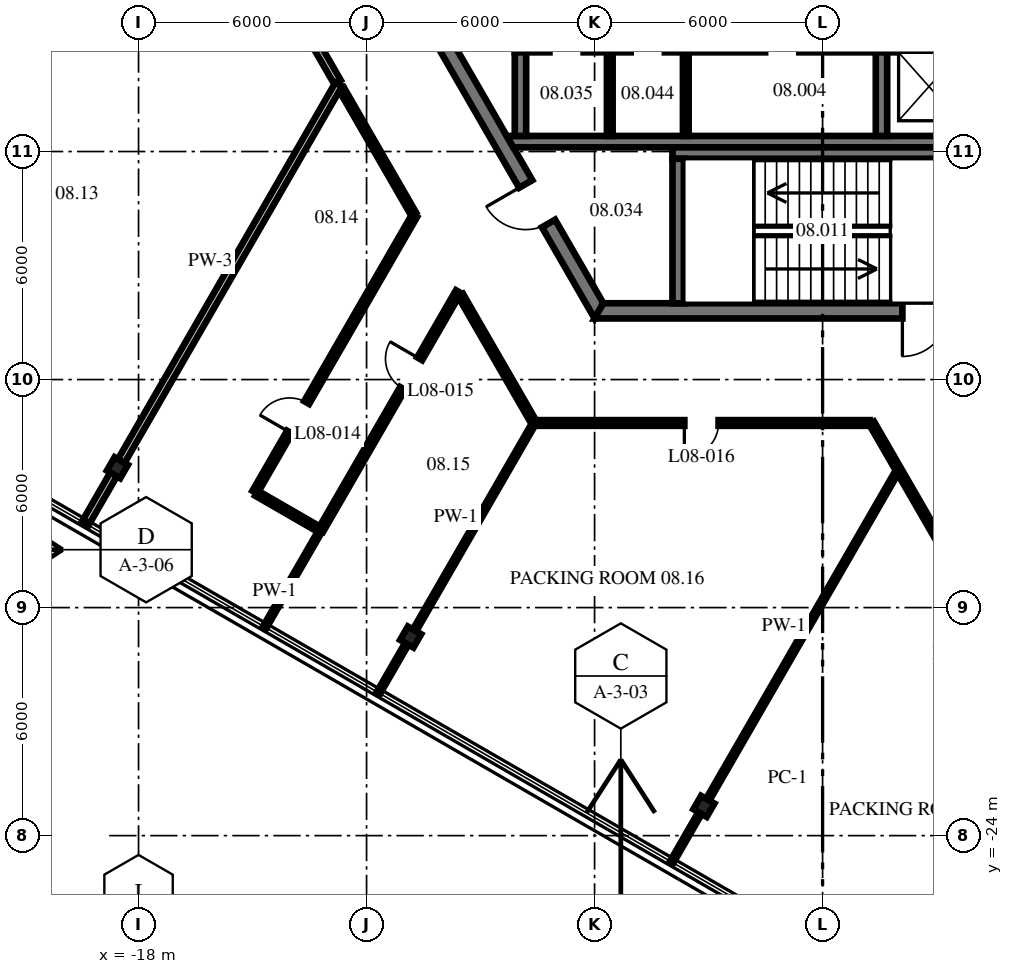
"""IFC4 building model, lengths in metres.
Left out: names, types, materials, properties, quantities, classifications, styles, units other than length and angle.
Written with IfcOpenShell. Run it as: python <this file> out.ifc"""

import sys

from ifc_helpers import new_model, si_unit, direction, frame, frame_2d, origin, origin_2d, place, context, subcontext, project, spatial, polyline, rectangle, i_section, outline, extrude, source, transform, mapped, element, fill, save


model = new_model("IFC4")
c1 = context("Model", 3, precision=1e-05, world=origin(), true_north=direction((0.0, 1.0)))
c2 = subcontext(c1, "Body", "Model", "MODEL_VIEW")
j1 = project(units=[si_unit("LENGTHUNIT", "METRE"), si_unit("PLANEANGLEUNIT", "RADIAN")], contexts=[c1])
p1 = place(None, origin())
s1 = spatial("IfcSite", under=j1, at=p1, CompositionType="ELEMENT")
p2 = place(p1, origin())
s2 = spatial("IfcBuilding", under=s1, at=p2, CompositionType="ELEMENT")
p3 = place(p2, frame((0.0, 0.0, 37.5)))
s3 = spatial("IfcBuildingStorey", under=s2, at=p3, CompositionType="ELEMENT", Elevation=37.5)
m1 = source(origin(), c2, "Body", "SweptSolid", [
    extrude(i_section(OverallWidth=0.404, OverallDepth=0.406, WebThickness=0.027, FlangeThickness=0.044, at=origin_2d()), origin(), (0.0, 0.0, 1.0), 4.3),
])
for number, where, z_axis, x_axis in (
    (1, (-18.556, -14.32, 0.0), (0.0, 0.0, 1.0), (0.866, -0.5, 0.0)),
    (2, (-10.84, -18.775, 0.0), (0.0, 0.0, 1.0), (0.866, -0.5, 0.0)),
    (3, (-3.124, -23.23, 0.0), (0.0, 0.0, 1.0), (0.866, -0.5, 0.0)),
):
    element("IfcColumn", number, at=place(p3, frame(where, z_axis=z_axis, x_axis=x_axis)), inside=s3, PredefinedType="COLUMN", context=c2, shape_type="MappedRepresentation", body=[
        mapped(m1, transform((0.0, 0.0, 0.0), scale=1.0)),
    ])
m2 = source(origin(), c2, "Body", "SweptSolid", [
    extrude(outline(polyline([(-0.115, -0.2), (11.885, -0.2), (11.654, 0.2), (0.115, 0.2), (-0.115, -0.2)])), origin(), (0.0, 0.0, 1.0), 4.1),
])
p4 = place(p3, frame((-11.769, 0.0, 0.0), z_axis=(0.0, 0.0, 1.0), x_axis=(0.499996592174, -0.866027371285, 0.0)))
e4 = element("IfcWall", 4, at=p4, inside=s3, PredefinedType="SHEAR", context=c2, shape_type="MappedRepresentation", body=[
    mapped(m2, transform((0.0, 0.0, 0.0), scale=1.0)),
])
p5 = place(p4, frame((1.405, 0.0, 0.0)))
e5 = element("IfcOpeningElement", 5, at=p5, cuts=e4, PredefinedType="OPENING", context=c2, shape_type="SweptSolid", body=[
    extrude(rectangle(XDim=1.8, YDim=2.1, at=frame_2d((0.9, 1.05))), frame((0.0, 0.21, 0.0), z_axis=(0.0, -1.0, 0.0), x_axis=(1.0, 0.0, 0.0)), (0.0, 0.0, 1.0), 0.42),
])
p6 = place(p4, frame((7.915, 0.0, 0.0)))
e6 = element("IfcOpeningElement", 6, at=p6, cuts=e4, PredefinedType="OPENING", context=c2, shape_type="SweptSolid", body=[
    extrude(rectangle(XDim=1.2, YDim=2.1, at=frame_2d((0.6, 1.05))), frame((0.0, 0.21, 0.0), z_axis=(0.0, -1.0, 0.0), x_axis=(1.0, 0.0, 0.0)), (0.0, 0.0, 1.0), 0.42),
])
p7 = place(p3, frame((-5.885, -10.192, 0.0), z_axis=(0.0, 0.0, 1.0), x_axis=(1.0, 0.0, 0.0)))
e7 = element("IfcWall", 7, at=p7, inside=s3, PredefinedType="SHEAR", context=c2, shape_type="MappedRepresentation", body=[
    mapped(m2, transform((0.0, 0.0, 0.0), scale=1.0)),
])
p8 = place(p7, frame((7.985, 0.0, 0.0)))
e8 = element("IfcOpeningElement", 8, at=p8, cuts=e7, PredefinedType="OPENING", context=c2, shape_type="SweptSolid", body=[
    extrude(rectangle(XDim=1.2, YDim=2.1, at=frame_2d((0.6, 1.05))), frame((0.0, 0.21, 0.0), z_axis=(0.0, -1.0, 0.0), x_axis=(1.0, 0.0, 0.0)), (0.0, 0.0, 1.0), 0.42),
])
m3 = source(origin(), c2, "Body", "SweptSolid", [
    extrude(rectangle(XDim=12.8, YDim=0.3, at=frame_2d((6.4, 0.0))), origin(), (0.0, 0.0, 1.0), 4.1),
])
p9 = place(p3, frame((-8.1, -3.24, 0.0), z_axis=(0.0, 0.0, 1.0), x_axis=(1.0, 0.0, 0.0)))
e9 = element("IfcWall", 9, at=p9, inside=s3, PredefinedType="SHEAR", context=c2, shape_type="MappedRepresentation", body=[
    mapped(m3, transform((0.0, 0.0, 0.0), scale=1.0)),
])
p10 = place(p9, frame((0.913, 0.0, 0.0)))
e10 = element("IfcOpeningElement", 10, at=p10, cuts=e9, PredefinedType="OPENING", context=c2, shape_type="SweptSolid", body=[
    extrude(rectangle(XDim=0.9, YDim=2.1, at=frame_2d((0.45, 1.05))), frame((0.0, 0.16, 0.0), z_axis=(0.0, -1.0, 0.0), x_axis=(1.0, 0.0, 0.0)), (0.0, 0.0, 1.0), 0.32),
])
p11 = place(p9, frame((3.05, 0.0, 0.0)))
e11 = element("IfcOpeningElement", 11, at=p11, cuts=e9, PredefinedType="OPENING", context=c2, shape_type="SweptSolid", body=[
    extrude(rectangle(XDim=0.9, YDim=2.1, at=frame_2d((0.45, 1.05))), frame((0.0, 0.16, 0.0), z_axis=(0.0, -1.0, 0.0), x_axis=(1.0, 0.0, 0.0)), (0.0, 0.0, 1.0), 0.32),
])
p12 = place(p9, frame((6.587, 0.0, 0.0)))
e12 = element("IfcOpeningElement", 12, at=p12, cuts=e9, PredefinedType="OPENING", context=c2, shape_type="SweptSolid", body=[
    extrude(rectangle(XDim=0.9, YDim=2.1, at=frame_2d((0.45, 1.05))), frame((0.0, 0.16, 0.0), z_axis=(0.0, -1.0, 0.0), x_axis=(1.0, 0.0, 0.0)), (0.0, 0.0, 1.0), 0.32),
])
p13 = place(p9, frame((10.35, 0.0, 0.0)))
e13 = element("IfcOpeningElement", 13, at=p13, cuts=e9, PredefinedType="OPENING", context=c2, shape_type="SweptSolid", body=[
    extrude(rectangle(XDim=1.1, YDim=2.1, at=frame_2d((0.55, 1.05))), frame((0.0, 0.16, 0.0), z_axis=(0.0, -1.0, 0.0), x_axis=(1.0, 0.0, 0.0)), (0.0, 0.0, 1.0), 0.32),
])
m4 = source(origin(), c2, "Body", "SweptSolid", [
    extrude(outline(polyline([(12.0, -0.15), (-0.04, -0.15), (-0.213, 0.15), (12.0, 0.15), (12.0, -0.15)])), origin(), (0.0, 0.0, 1.0), 4.1),
])
p14 = place(p3, frame((-8.1, -5.74, 0.0), z_axis=(0.0, 0.0, 1.0), x_axis=(1.0, 0.0, 0.0)))
e14 = element("IfcWall", 14, at=p14, inside=s3, PredefinedType="SHEAR", context=c2, shape_type="MappedRepresentation", body=[
    mapped(m4, transform((0.0, 0.0, 0.0), scale=1.0)),
])
m5 = source(origin(), c2, "Body", "SweptSolid", [
    extrude(rectangle(XDim=2.2, YDim=0.3, at=frame_2d((1.1, 0.0))), origin(), (0.0, 0.0, 1.0), 4.1),
])
for number, where, z_axis, x_axis in (
    (15, (-7.95, -5.59, 0.0), (0.0, 0.0, 1.0), (0.0, 1.0, 0.0)),
    (16, (1.55, -5.59, 0.0), (0.0, 0.0, 1.0), (0.0, 1.0, 0.0)),
):
    element("IfcWall", number, at=place(p3, frame(where, z_axis=z_axis, x_axis=x_axis)), inside=s3, PredefinedType="SHEAR", context=c2, shape_type="MappedRepresentation", body=[
        mapped(m5, transform((0.0, 0.0, 0.0), scale=1.0)),
    ])
m6 = source(origin(), c2, "Body", "SweptSolid", [
    extrude(outline(polyline([(0.0, -0.15), (8.95, -0.15), (8.65, 0.15), (0.0, 0.15), (0.0, -0.15)])), origin(), (0.0, 0.0, 1.0), 4.1),
])
p15 = place(p3, frame((-3.95, -6.04, 0.0), z_axis=(0.0, 0.0, 1.0), x_axis=(1.0, 0.0, 0.0)))
e17 = element("IfcWall", 17, at=p15, inside=s3, PredefinedType="SHEAR", context=c2, shape_type="MappedRepresentation", body=[
    mapped(m6, transform((0.0, 0.0, 0.0), scale=1.0)),
])
m7 = source(origin(), c2, "Body", "SweptSolid", [
    extrude(outline(polyline([(3.8, -0.15), (-0.004, -0.15), (-0.004, 0.15), (3.8, 0.15), (3.8, -0.15)])), origin(), (0.0, 0.0, 1.0), 4.1),
])
p16 = place(p3, frame((-3.8, -9.99, 0.0), z_axis=(0.0, 0.0, 1.0), x_axis=(0.0, 1.0, 0.0)))
e18 = element("IfcWall", 18, at=p16, inside=s3, PredefinedType="SHEAR", context=c2, shape_type="MappedRepresentation", body=[
    mapped(m7, transform((0.0, 0.0, 0.0), scale=1.0)),
])
m8 = source(origin(), c2, "Body", "SweptSolid", [
    extrude(rectangle(XDim=2.2, YDim=0.15, at=frame_2d((1.1, 0.0))), origin(), (0.0, 0.0, 1.0), 4.1),
])
for number, where, z_axis, x_axis in (
    (19, (-5.6, -5.59, 0.0), (0.0, 0.0, 1.0), (0.0, 1.0, 0.0)),
    (20, (-3.6, -5.59, 0.0), (0.0, 0.0, 1.0), (0.0, 1.0, 0.0)),
):
    element("IfcWall", number, at=place(p3, frame(where, z_axis=z_axis, x_axis=x_axis)), inside=s3, PredefinedType="PARTITIONING", context=c2, shape_type="MappedRepresentation", body=[
        mapped(m8, transform((0.0, 0.0, 0.0), scale=1.0)),
    ])
p17 = place(p3, frame((-15.14, -0.061, 0.0), z_axis=(0.0, 0.0, 1.0), x_axis=(0.500002721793, -0.866023832351, 0.0)))
e21 = element("IfcWall", 21, at=p17, inside=s3, PredefinedType="PARTITIONING", context=c2, shape_type="SweptSolid", body=[
    extrude(rectangle(XDim=4.75, YDim=0.2, at=frame_2d((2.375, 0.0))), origin(), (0.0, 0.0, 1.0), 4.1),
])
p18 = place(p17, frame((1.88, 0.0, 0.0)))
e22 = element("IfcOpeningElement", 22, at=p18, cuts=e21, PredefinedType="OPENING", context=c2, shape_type="SweptSolid", body=[
    extrude(rectangle(XDim=1.0, YDim=2.1, at=frame_2d((0.5, 1.05))), frame((0.0, 0.11, 0.0), z_axis=(0.0, -1.0, 0.0), x_axis=(1.0, 0.0, 0.0)), (0.0, 0.0, 1.0), 0.22),
])
p19 = place(p3, frame((-12.665, -4.348, 0.0), z_axis=(0.0, 0.0, 1.0), x_axis=(0.500009333805, -0.866020014843, 0.0)))
e23 = element("IfcWall", 23, at=p19, inside=s3, PredefinedType="PARTITIONING", context=c2, shape_type="SweptSolid", body=[
    extrude(rectangle(XDim=3.806, YDim=0.15, at=frame_2d((1.903, 0.0))), origin(), (0.0, 0.0, 1.0), 4.1),
])
p20 = place(p3, frame((-9.527, -9.783, 0.0), z_axis=(0.0, 0.0, 1.0), x_axis=(0.500013098431, -0.86601784127, 0.0)))
e24 = element("IfcWall", 24, at=p20, inside=s3, PredefinedType="PARTITIONING", context=c2, shape_type="SweptSolid", body=[
    extrude(rectangle(XDim=3.83, YDim=0.15, at=frame_2d((1.915, 0.0))), origin(), (0.0, 0.0, 1.0), 4.1),
])
p21 = place(p3, frame((1.289, -13.142, 0.0), z_axis=(0.0, 0.0, 1.0), x_axis=(0.500002274473, -0.866024090613, 0.0)))
e25 = element("IfcWall", 25, at=p21, inside=s3, PredefinedType="PARTITIONING", context=c2, shape_type="SweptSolid", body=[
    extrude(rectangle(XDim=19.385, YDim=0.15, at=frame_2d((9.692, 0.0))), origin(), (0.0, 0.0, 1.0), 4.1),
])
p22 = place(p21, frame((6.062, 0.0, 0.0)))
e26 = element("IfcOpeningElement", 26, at=p22, cuts=e25, PredefinedType="OPENING", context=c2, shape_type="SweptSolid", body=[
    extrude(rectangle(XDim=0.9, YDim=2.1, at=frame_2d((0.45, 1.05))), frame((0.0, 0.085, 0.0), z_axis=(0.0, -1.0, 0.0), x_axis=(1.0, 0.0, 0.0)), (0.0, 0.0, 1.0), 0.17),
])
p23 = place(p21, frame((15.05, 0.0, 0.0)))
e27 = element("IfcOpeningElement", 27, at=p23, cuts=e25, PredefinedType="OPENING", context=c2, shape_type="SweptSolid", body=[
    extrude(rectangle(XDim=0.9, YDim=2.1, at=frame_2d((0.45, 1.05))), frame((0.0, 0.085, 0.0), z_axis=(0.0, -1.0, 0.0), x_axis=(1.0, 0.0, 0.0)), (0.0, 0.0, 1.0), 0.17),
])
m9 = source(origin(), c2, "Body", "SweptSolid", [
    extrude(rectangle(XDim=1.89, YDim=0.15, at=frame_2d((0.945, 0.0))), origin(), (0.0, 0.0, 1.0), 4.1),
])
p24 = place(p3, frame((-14.896, -14.991, 0.0), z_axis=(0.0, 0.0, 1.0), x_axis=(0.866000578957, -0.500042995397, 0.0)))
e28 = element("IfcWall", 28, at=p24, inside=s3, PredefinedType="PARTITIONING", context=c2, shape_type="MappedRepresentation", body=[
    mapped(m9, transform((0.0, 0.0, 0.0), scale=1.0)),
])
p25 = place(p3, frame((-7.588, -13.142, 0.0), z_axis=(0.0, 0.0, 1.0), x_axis=(1.0, 0.0, 0.0)))
e29 = element("IfcWall", 29, at=p25, inside=s3, PredefinedType="PARTITIONING", context=c2, shape_type="SweptSolid", body=[
    extrude(rectangle(XDim=8.827, YDim=0.15, at=frame_2d((4.413, 0.0))), origin(), (0.0, 0.0, 1.0), 4.1),
])
p26 = place(p25, frame((3.95, 0.0, 0.0)))
e30 = element("IfcOpeningElement", 30, at=p26, cuts=e29, PredefinedType="OPENING", context=c2, shape_type="SweptSolid", body=[
    extrude(rectangle(XDim=0.9, YDim=2.1, at=frame_2d((0.45, 1.05))), frame((0.0, 0.085, 0.0), z_axis=(0.0, -1.0, 0.0), x_axis=(1.0, 0.0, 0.0)), (0.0, 0.0, 1.0), 0.17),
])
p27 = place(p3, frame((-3.969, -24.695, 0.0), z_axis=(0.0, 0.0, 1.0), x_axis=(0.499905760005, 0.866079806435, 0.0)))
e31 = element("IfcWall", 31, at=p27, inside=s3, PredefinedType="PARTITIONING", context=c2, shape_type="SweptSolid", body=[
    extrude(rectangle(XDim=1.499, YDim=0.1, at=frame_2d((0.75, 0.0))), origin(), (0.0, 0.0, 1.0), 4.1),
])
m10 = source(origin(), c2, "Body", "SweptSolid", [
    extrude(rectangle(XDim=9.953, YDim=0.1, at=frame_2d((4.977, 0.0))), origin(), (0.0, 0.0, 1.0), 3.343),
])
p28 = place(p3, frame((-3.027, -23.063, 0.0), z_axis=(0.0, 0.0, 1.0), x_axis=(0.499990692214, 0.866030777571, 0.0)))
e32 = element("IfcWall", 32, at=p28, inside=s3, PredefinedType="PARTITIONING", context=c2, shape_type="MappedRepresentation", body=[
    mapped(m10, transform((0.0, 0.0, 0.0), scale=1.0)),
])
m11 = source(origin(), c2, "Body", "SweptSolid", [
    extrude(rectangle(XDim=1.499, YDim=0.1, at=frame_2d((0.749, 0.0))), origin(), (0.0, 0.0, 1.0), 4.1),
])
p29 = place(p3, frame((-11.686, -20.24, 0.0), z_axis=(0.0, 0.0, 1.0), x_axis=(0.499976292358, 0.866039090965, 0.0)))
e33 = element("IfcWall", 33, at=p29, inside=s3, PredefinedType="PARTITIONING", context=c2, shape_type="MappedRepresentation", body=[
    mapped(m11, transform((0.0, 0.0, 0.0), scale=1.0)),
])
m12 = source(origin(), c2, "Body", "SweptSolid", [
    extrude(rectangle(XDim=6.271, YDim=0.1, at=frame_2d((3.135, 0.0))), origin(), (0.0, 0.0, 1.0), 3.488),
])
p30 = place(p3, frame((-10.743, -18.608, 0.0), z_axis=(0.0, 0.0, 1.0), x_axis=(0.500012281615, 0.866018312875, 0.0)))
e34 = element("IfcWall", 34, at=p30, inside=s3, PredefinedType="PARTITIONING", context=c2, shape_type="MappedRepresentation", body=[
    mapped(m12, transform((0.0, 0.0, 0.0), scale=1.0)),
])
p31 = place(p3, frame((-14.677, -18.513, 0.0), z_axis=(0.0, 0.0, 1.0), x_axis=(0.499959535909, 0.866048764478, 0.0)))
e35 = element("IfcWall", 35, at=p31, inside=s3, PredefinedType="PARTITIONING", context=c2, shape_type="SweptSolid", body=[
    extrude(rectangle(XDim=2.942, YDim=0.1, at=frame_2d((1.471, 0.0))), origin(), (0.0, 0.0, 1.0), 4.1),
])
m13 = source(origin(), c2, "Body", "SweptSolid", [
    extrude(rectangle(XDim=7.249, YDim=0.15, at=frame_2d((3.625, 0.0))), origin(), (0.0, 0.0, 1.0), 4.1),
])
p32 = place(p3, frame((-13.207, -15.965, 0.0), z_axis=(0.0, 0.0, 1.0), x_axis=(0.500014967241, 0.866016762271, 0.0)))
e36 = element("IfcWall", 36, at=p32, inside=s3, PredefinedType="PARTITIONING", context=c2, shape_type="MappedRepresentation", body=[
    mapped(m13, transform((0.0, 0.0, 0.0), scale=1.0)),
])
p33 = place(p32, frame((4.31, 0.0, 0.0)))
e37 = element("IfcOpeningElement", 37, at=p33, cuts=e36, PredefinedType="OPENING", context=c2, shape_type="SweptSolid", body=[
    extrude(rectangle(XDim=0.9, YDim=2.1, at=frame_2d((0.45, 1.05))), frame((0.0, 0.085, 0.0), z_axis=(0.0, -1.0, 0.0), x_axis=(1.0, 0.0, 0.0)), (0.0, 0.0, 1.0), 0.17),
])
p34 = place(p3, frame((-14.939, -14.965, 0.0), z_axis=(0.0, 0.0, 1.0), x_axis=(0.499994897466, 0.866028349714, 0.0)))
e38 = element("IfcWall", 38, at=p34, inside=s3, PredefinedType="PARTITIONING", context=c2, shape_type="SweptSolid", body=[
    extrude(rectangle(XDim=8.403, YDim=0.15, at=frame_2d((4.202, 0.0))), origin(), (0.0, 0.0, 1.0), 4.1),
])
p35 = place(p34, frame((1.826, 0.0, 0.0)))
e39 = element("IfcOpeningElement", 39, at=p35, cuts=e38, PredefinedType="OPENING", context=c2, shape_type="SweptSolid", body=[
    extrude(rectangle(XDim=0.9, YDim=2.1, at=frame_2d((0.45, 1.05))), frame((0.0, 0.085, 0.0), z_axis=(0.0, -1.0, 0.0), x_axis=(1.0, 0.0, 0.0)), (0.0, 0.0, 1.0), 0.17),
])
m14 = source(origin(), c2, "Body", "SweptSolid", [
    extrude(rectangle(XDim=1.499, YDim=0.2, at=frame_2d((0.749, 0.0))), origin(), (0.0, 0.0, 1.0), 4.1),
])
p36 = place(p3, frame((-19.402, -15.785, 0.0), z_axis=(0.0, 0.0, 1.0), x_axis=(0.499976292358, 0.866039090965, 0.0)))
e40 = element("IfcWall", 40, at=p36, inside=s3, PredefinedType="PARTITIONING", context=c2, shape_type="MappedRepresentation", body=[
    mapped(m14, transform((0.0, 0.0, 0.0), scale=1.0)),
])
m15 = source(origin(), c2, "Body", "SweptSolid", [
    extrude(rectangle(XDim=11.455, YDim=0.2, at=frame_2d((5.728, 0.0))), origin(), (0.0, 0.0, 1.0), 3.343),
])
p37 = place(p3, frame((-18.459, -14.153, 0.0), z_axis=(0.0, 0.0, 1.0), x_axis=(0.500008416231, 0.866020544617, 0.0)))
e41 = element("IfcWall", 41, at=p37, inside=s3, PredefinedType="PARTITIONING", context=c2, shape_type="MappedRepresentation", body=[
    mapped(m15, transform((0.0, 0.0, 0.0), scale=1.0)),
])
p38 = place(p8, frame((1.2, 0.0, 0.0), z_axis=(0.0, 0.0, 1.0), x_axis=(-1.0, 0.0, 0.0)))
e42 = element("IfcDoor", 42, at=p38, inside=s3, OperationType="SINGLE_SWING_RIGHT", PredefinedType="DOOR", context=c2, shape_type="SweptSolid", body=[
    extrude(rectangle(XDim=1.2, YDim=2.1, at=frame_2d((0.6, 1.05))), frame((0.0, 0.025, 0.0), z_axis=(0.0, -1.0, 0.0), x_axis=(1.0, 0.0, 0.0)), (0.0, 0.0, 1.0), 0.05),
])
fill(e8, e42)
p39 = place(p6, frame((1.2, 0.0, 0.0), z_axis=(0.0, 0.0, 1.0), x_axis=(-1.0, 0.0, 0.0)))
e43 = element("IfcDoor", 43, at=p39, inside=s3, OperationType="SINGLE_SWING_RIGHT", PredefinedType="DOOR", context=c2, shape_type="SweptSolid", body=[
    extrude(rectangle(XDim=1.2, YDim=2.1, at=frame_2d((0.6, 1.05))), frame((0.0, 0.025, 0.0), z_axis=(0.0, -1.0, 0.0), x_axis=(1.0, 0.0, 0.0)), (0.0, 0.0, 1.0), 0.05),
])
fill(e6, e43)
p40 = place(p35, origin())
e44 = element("IfcDoor", 44, at=p40, inside=s3, OperationType="SINGLE_SWING_LEFT", PredefinedType="DOOR", context=c2, shape_type="SweptSolid", body=[
    extrude(rectangle(XDim=0.9, YDim=2.1, at=frame_2d((0.45, 1.05))), frame((0.0, 0.025, 0.0), z_axis=(0.0, -1.0, 0.0), x_axis=(1.0, 0.0, 0.0)), (0.0, 0.0, 1.0), 0.05),
])
fill(e39, e44)
p41 = place(p33, origin())
e45 = element("IfcDoor", 45, at=p41, inside=s3, OperationType="SINGLE_SWING_LEFT", PredefinedType="DOOR", context=c2, shape_type="SweptSolid", body=[
    extrude(rectangle(XDim=0.9, YDim=2.1, at=frame_2d((0.45, 1.05))), frame((0.0, 0.025, 0.0), z_axis=(0.0, -1.0, 0.0), x_axis=(1.0, 0.0, 0.0)), (0.0, 0.0, 1.0), 0.05),
])
fill(e37, e45)
p42 = place(p26, origin())
e46 = element("IfcDoor", 46, at=p42, inside=s3, OperationType="SINGLE_SWING_RIGHT", PredefinedType="DOOR", context=c2, shape_type="SweptSolid", body=[
    extrude(rectangle(XDim=0.9, YDim=2.1, at=frame_2d((0.45, 1.05))), frame((0.0, 0.025, 0.0), z_axis=(0.0, -1.0, 0.0), x_axis=(1.0, 0.0, 0.0)), (0.0, 0.0, 1.0), 0.05),
])
fill(e30, e46)
save(model, sys.argv[1])
